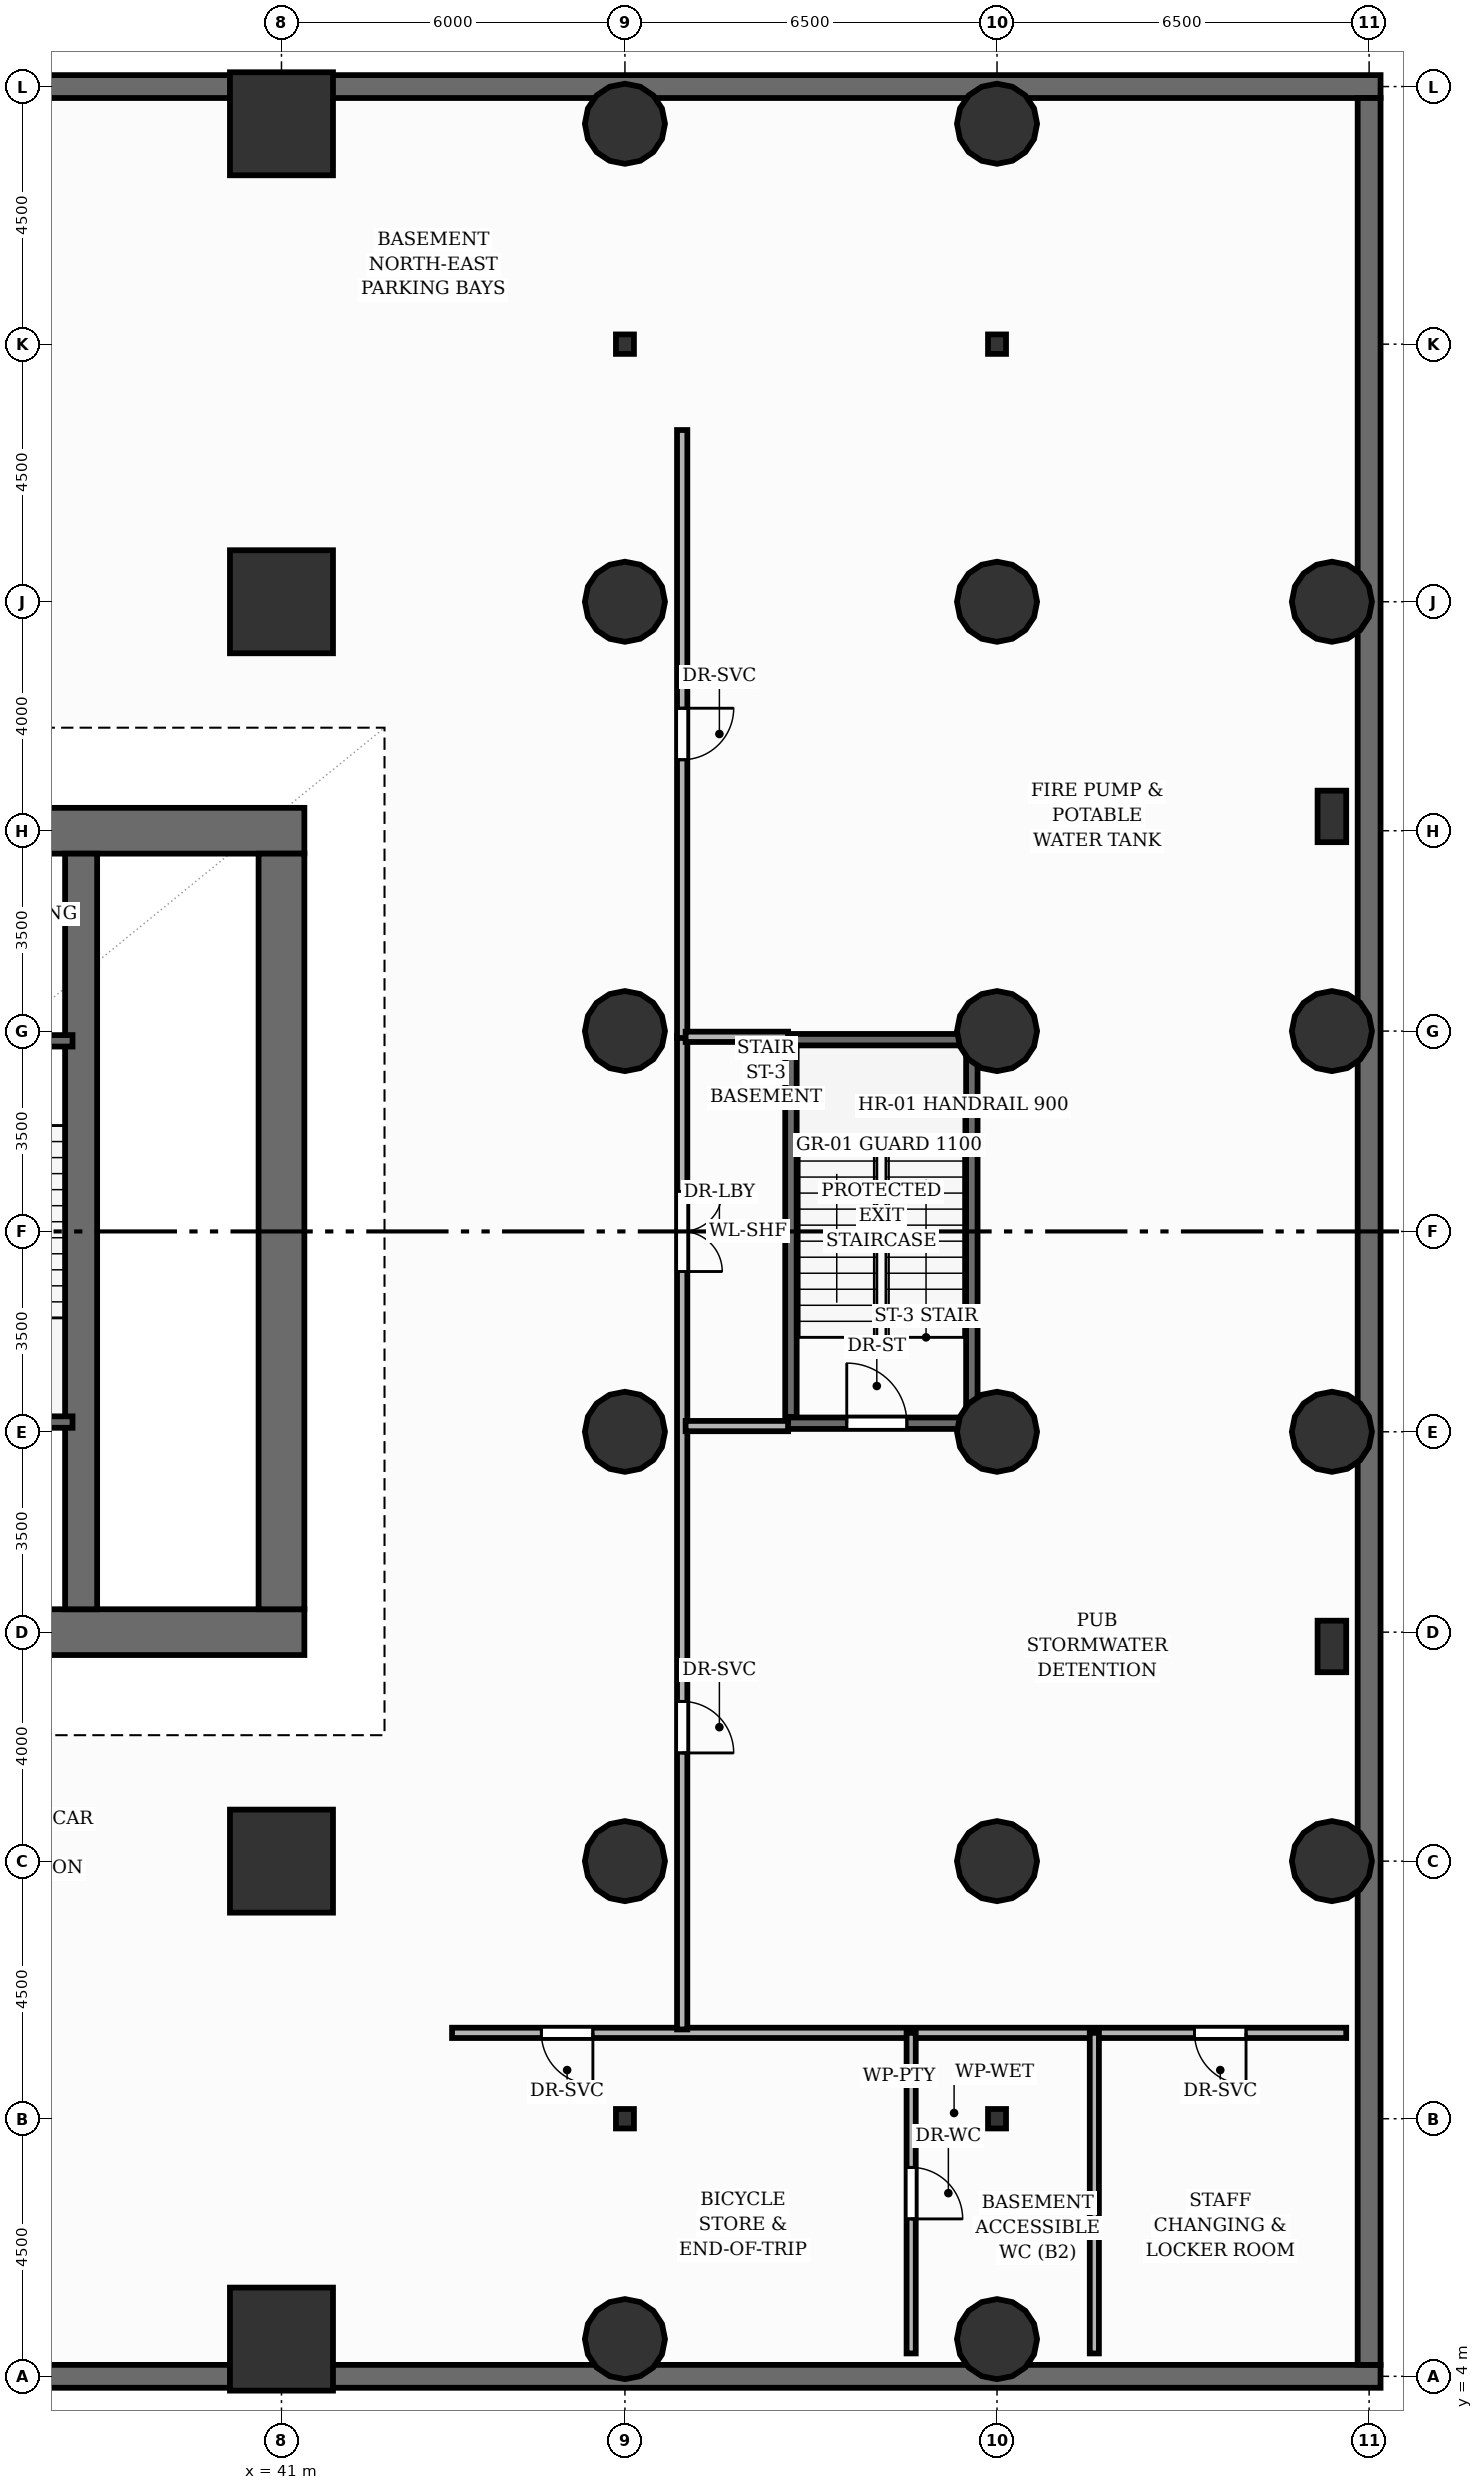
"""IFC4 building model, lengths in metres.
Left out: names, types, materials, properties, quantities, classifications, styles, units other than length and angle.
Written with IfcOpenShell. Run it as: python <this file> out.ifc"""

import sys

from ifc_helpers import new_model, si_unit, direction, frame, frame_2d, origin, origin_2d, place, context, subcontext, project, spatial, rectangle, circle, i_section, extrude, element, fill, save


model = new_model("IFC4")
c1 = context("Model", 3, precision=1e-05, world=origin(), true_north=direction((0.0, 1.0)))
c2 = subcontext(c1, "Body", "Model", "MODEL_VIEW")
j1 = project(units=[si_unit("LENGTHUNIT", "METRE"), si_unit("PLANEANGLEUNIT", "RADIAN")], contexts=[c1])
p1 = place(None, origin())
s1 = spatial("IfcSite", under=j1, at=p1, CompositionType="ELEMENT")
p2 = place(p1, origin())
s2 = spatial("IfcBuilding", under=s1, at=p2, CompositionType="ELEMENT")
p3 = place(p2, frame((0.0, 0.0, -9.0)))
s3 = spatial("IfcBuildingStorey", under=s2, at=p3, CompositionType="ELEMENT", Elevation=-9.0)
for number, where, z_axis, x_axis in (
    (1, (3.8, 4.0, 0.0), (0.0, 0.0, 1.0), (1.0, 0.0, 0.0)),
    (2, (3.8, 44.0, 0.0), (0.0, 0.0, 1.0), (1.0, 0.0, 0.0)),
):
    element("IfcWall", number, at=place(p3, frame(where, z_axis=z_axis, x_axis=x_axis)), inside=s3, PredefinedType="USERDEFINED", context=c2, shape_type="SweptSolid", body=[
        extrude(rectangle(XDim=56.4, YDim=0.4, at=frame_2d((28.2, 0.0))), origin(), (0.0, 0.0, 1.0), 4.5),
    ])
p4 = place(p3, frame((60.0, 4.2, 0.0), z_axis=(0.0, 0.0, 1.0), x_axis=(0.0, 1.0, 0.0)))
e3 = element("IfcWall", 3, at=p4, inside=s3, PredefinedType="USERDEFINED", context=c2, shape_type="SweptSolid", body=[
    extrude(rectangle(XDim=39.6, YDim=0.4, at=frame_2d((19.8, 0.0))), origin(), (0.0, 0.0, 1.0), 4.5),
])
p5 = place(p3, frame((22.6, 17.0, 0.0), z_axis=(0.0, 0.0, 1.0), x_axis=(1.0, 0.0, 0.0)))
e4 = element("IfcWall", 4, at=p5, inside=s3, PredefinedType="SHEAR", context=c2, shape_type="SweptSolid", body=[
    extrude(rectangle(XDim=18.8, YDim=0.8, at=frame_2d((9.4, 0.0))), origin(), (0.0, 0.0, 1.0), 4.5),
])
p6 = place(p5, frame((5.9, 0.0, 0.0)))
e5 = element("IfcOpeningElement", 5, at=p6, cuts=e4, PredefinedType="OPENING", context=c2, shape_type="SweptSolid", body=[
    extrude(rectangle(XDim=1.1, YDim=2.15, at=frame_2d((0.55, 1.075))), frame((0.0, 0.41, 0.0), z_axis=(0.0, -1.0, 0.0), x_axis=(1.0, 0.0, 0.0)), (0.0, 0.0, 1.0), 0.82),
])
p7 = place(p3, frame((22.6, 31.0, 0.0), z_axis=(0.0, 0.0, 1.0), x_axis=(1.0, 0.0, 0.0)))
e6 = element("IfcWall", 6, at=p7, inside=s3, PredefinedType="SHEAR", context=c2, shape_type="SweptSolid", body=[
    extrude(rectangle(XDim=18.8, YDim=0.8, at=frame_2d((9.4, 0.0))), origin(), (0.0, 0.0, 1.0), 4.5),
])
p8 = place(p7, frame((11.8, 0.0, 0.0)))
e7 = element("IfcOpeningElement", 7, at=p8, cuts=e6, PredefinedType="OPENING", context=c2, shape_type="SweptSolid", body=[
    extrude(rectangle(XDim=1.1, YDim=2.15, at=frame_2d((0.55, 1.075))), frame((0.0, 0.41, 0.0), z_axis=(0.0, -1.0, 0.0), x_axis=(1.0, 0.0, 0.0)), (0.0, 0.0, 1.0), 0.82),
])
p9 = place(p3, frame((41.0, 17.4, 0.0), z_axis=(0.0, 0.0, 1.0), x_axis=(0.0, 1.0, 0.0)))
e8 = element("IfcWall", 8, at=p9, inside=s3, PredefinedType="SHEAR", context=c2, shape_type="SweptSolid", body=[
    extrude(rectangle(XDim=13.2, YDim=0.8, at=frame_2d((6.6, 0.0))), origin(), (0.0, 0.0, 1.0), 4.5),
])
p10 = place(p3, frame((37.5, 17.4, 0.0), z_axis=(0.0, 0.0, 1.0), x_axis=(0.0, 1.0, 0.0)))
e9 = element("IfcWall", 9, at=p10, inside=s3, PredefinedType="SHEAR", context=c2, shape_type="SweptSolid", body=[
    extrude(rectangle(XDim=13.2, YDim=0.56, at=frame_2d((6.6, 0.0))), origin(), (0.0, 0.0, 1.0), 4.5),
])
for number, where, z_axis, x_axis in (
    (10, (47.0, 4.65, 0.0), (0.0, 0.0, 1.0), (1.0, 0.0, 0.0)),
    (11, (47.0, 13.0, 0.0), (0.0, 0.0, 1.0), (1.0, 0.0, 0.0)),
    (12, (47.0, 20.5, 0.0), (0.0, 0.0, 1.0), (1.0, 0.0, 0.0)),
    (13, (47.0, 27.5, 0.0), (0.0, 0.0, 1.0), (1.0, 0.0, 0.0)),
    (14, (47.0, 35.0, 0.0), (0.0, 0.0, 1.0), (1.0, 0.0, 0.0)),
    (15, (47.0, 43.35, 0.0), (0.0, 0.0, 1.0), (1.0, 0.0, 0.0)),
    (16, (53.5, 4.65, 0.0), (0.0, 0.0, 1.0), (1.0, 0.0, 0.0)),
    (17, (53.5, 13.0, 0.0), (0.0, 0.0, 1.0), (1.0, 0.0, 0.0)),
    (18, (53.5, 20.5, 0.0), (0.0, 0.0, 1.0), (1.0, 0.0, 0.0)),
    (19, (53.5, 27.5, 0.0), (0.0, 0.0, 1.0), (1.0, 0.0, 0.0)),
    (20, (53.5, 35.0, 0.0), (0.0, 0.0, 1.0), (1.0, 0.0, 0.0)),
    (21, (53.5, 43.35, 0.0), (0.0, 0.0, 1.0), (1.0, 0.0, 0.0)),
    (22, (59.35, 13.0, 0.0), (0.0, 0.0, 1.0), (1.0, 0.0, 0.0)),
    (23, (59.35, 20.5, 0.0), (0.0, 0.0, 1.0), (1.0, 0.0, 0.0)),
    (24, (59.35, 27.5, 0.0), (0.0, 0.0, 1.0), (1.0, 0.0, 0.0)),
    (25, (59.35, 35.0, 0.0), (0.0, 0.0, 1.0), (1.0, 0.0, 0.0)),
):
    element("IfcColumn", number, at=place(p3, frame(where, z_axis=z_axis, x_axis=x_axis)), inside=s3, PredefinedType="COLUMN", context=c2, shape_type="SweptSolid", body=[
        extrude(circle(Radius=0.7, at=origin_2d()), origin(), (0.0, 0.0, 1.0), 4.5),
    ])
for number, where, z_axis, x_axis in (
    (26, (41.0, 4.65, 0.0), (0.0, 0.0, 1.0), (1.0, 0.0, 0.0)),
    (27, (41.0, 13.0, 0.0), (0.0, 0.0, 1.0), (1.0, 0.0, 0.0)),
    (28, (41.0, 35.0, 0.0), (0.0, 0.0, 1.0), (1.0, 0.0, 0.0)),
    (29, (41.0, 43.35, 0.0), (0.0, 0.0, 1.0), (1.0, 0.0, 0.0)),
):
    element("IfcColumn", number, at=place(p3, frame(where, z_axis=z_axis, x_axis=x_axis)), inside=s3, PredefinedType="COLUMN", context=c2, shape_type="SweptSolid", body=[
        extrude(rectangle(XDim=1.8, YDim=1.8, at=origin_2d()), origin(), (0.0, 0.0, 1.0), 4.5),
    ])
for number, where, z_axis, x_axis in (
    (30, (47.0, 8.5, 0.0), (0.0, 0.0, 1.0), (1.0, 0.0, 0.0)),
    (31, (53.5, 8.5, 0.0), (0.0, 0.0, 1.0), (1.0, 0.0, 0.0)),
    (32, (47.0, 39.5, 0.0), (0.0, 0.0, 1.0), (1.0, 0.0, 0.0)),
    (33, (53.5, 39.5, 0.0), (0.0, 0.0, 1.0), (1.0, 0.0, 0.0)),
):
    element("IfcColumn", number, at=place(p3, frame(where, z_axis=z_axis, x_axis=x_axis)), inside=s3, PredefinedType="COLUMN", context=c2, shape_type="SweptSolid", body=[
        extrude(i_section(OverallWidth=0.314, OverallDepth=0.34, WebThickness=0.019, FlangeThickness=0.031, at=origin_2d()), origin(), (0.0, 0.0, 1.0), 4.5),
    ])
for number, where, z_axis, x_axis in (
    (34, (59.35, 16.75, 0.0), (0.0, 0.0, 1.0), (1.0, 0.0, 0.0)),
    (35, (59.35, 31.25, 0.0), (0.0, 0.0, 1.0), (1.0, 0.0, 0.0)),
):
    element("IfcColumn", number, at=place(p3, frame(where, z_axis=z_axis, x_axis=x_axis)), inside=s3, PredefinedType="PILASTER", context=c2, shape_type="SweptSolid", body=[
        extrude(rectangle(XDim=0.5, YDim=0.9, at=origin_2d()), origin(), (0.0, 0.0, 1.0), 4.5),
    ])
p11 = place(p3, frame((34.11, 20.67, 0.0), z_axis=(0.0, 0.0, 1.0), x_axis=(1.0, 0.0, 0.0)))
e36 = element("IfcWall", 36, at=p11, inside=s3, PredefinedType="SHEAR", context=c2, shape_type="SweptSolid", body=[
    extrude(rectangle(XDim=3.24, YDim=0.2, at=frame_2d((1.62, 0.0))), origin(), (0.0, 0.0, 1.0), 4.5),
])
p12 = place(p3, frame((34.11, 27.33, 0.0), z_axis=(0.0, 0.0, 1.0), x_axis=(1.0, 0.0, 0.0)))
e37 = element("IfcWall", 37, at=p12, inside=s3, PredefinedType="SHEAR", context=c2, shape_type="SweptSolid", body=[
    extrude(rectangle(XDim=3.24, YDim=0.2, at=frame_2d((1.62, 0.0))), origin(), (0.0, 0.0, 1.0), 4.5),
])
p13 = place(p12, frame((1.135, 0.0, 0.0)))
e38 = element("IfcOpeningElement", 38, at=p13, cuts=e37, PredefinedType="OPENING", context=c2, shape_type="SweptSolid", body=[
    extrude(rectangle(XDim=1.05, YDim=2.15, at=frame_2d((0.525, 1.075))), frame((0.0, 0.11, 0.0), z_axis=(0.0, -1.0, 0.0), x_axis=(1.0, 0.0, 0.0)), (0.0, 0.0, 1.0), 0.22),
])
for number, where, z_axis, x_axis in (
    (39, (49.9, 20.76, 0.0), (0.0, 0.0, 1.0), (0.0, 1.0, 0.0)),
    (40, (53.06, 20.76, 0.0), (0.0, 0.0, 1.0), (0.0, 1.0, 0.0)),
):
    element("IfcWall", number, at=place(p3, frame(where, z_axis=z_axis, x_axis=x_axis)), inside=s3, PredefinedType="SHEAR", context=c2, shape_type="SweptSolid", body=[
        extrude(rectangle(XDim=6.48, YDim=0.2, at=frame_2d((3.24, 0.0))), origin(), (0.0, 0.0, 1.0), 4.5),
    ])
p14 = place(p3, frame((49.85, 20.65, 0.0), z_axis=(0.0, 0.0, 1.0), x_axis=(1.0, 0.0, 0.0)))
e41 = element("IfcWall", 41, at=p14, inside=s3, PredefinedType="SHEAR", context=c2, shape_type="SweptSolid", body=[
    extrude(rectangle(XDim=3.26, YDim=0.2, at=frame_2d((1.63, 0.0))), origin(), (0.0, 0.0, 1.0), 4.5),
])
p15 = place(p14, frame((1.025, 0.0, 0.0)))
e42 = element("IfcOpeningElement", 42, at=p15, cuts=e41, PredefinedType="OPENING", context=c2, shape_type="SweptSolid", body=[
    extrude(rectangle(XDim=1.05, YDim=2.15, at=frame_2d((0.525, 1.075))), frame((0.0, 0.11, 0.0), z_axis=(0.0, -1.0, 0.0), x_axis=(1.0, 0.0, 0.0)), (0.0, 0.0, 1.0), 0.22),
])
p16 = place(p3, frame((49.85, 27.35, 0.0), z_axis=(0.0, 0.0, 1.0), x_axis=(1.0, 0.0, 0.0)))
e43 = element("IfcWall", 43, at=p16, inside=s3, PredefinedType="SHEAR", context=c2, shape_type="SweptSolid", body=[
    extrude(rectangle(XDim=3.26, YDim=0.2, at=frame_2d((1.63, 0.0))), origin(), (0.0, 0.0, 1.0), 4.5),
])
p17 = place(p3, frame((59.6, 10.0, 0.0), z_axis=(0.0, 0.0, 1.0), x_axis=(-1.0, 0.0, 0.0)))
e44 = element("IfcWall", 44, at=p17, inside=s3, PredefinedType="PARTITIONING", context=c2, shape_type="SweptSolid", body=[
    extrude(rectangle(XDim=15.62, YDim=0.18, at=frame_2d((7.81, 0.0))), origin(), (0.0, 0.0, 1.0), 4.195),
])
p18 = place(p17, frame((13.16, 0.0, 0.0)))
e45 = element("IfcOpeningElement", 45, at=p18, cuts=e44, PredefinedType="OPENING", context=c2, shape_type="SweptSolid", body=[
    extrude(rectangle(XDim=0.9, YDim=2.1, at=frame_2d((0.45, 1.05))), frame((0.0, 0.1, 0.0), z_axis=(0.0, -1.0, 0.0), x_axis=(1.0, 0.0, 0.0)), (0.0, 0.0, 1.0), 0.2),
])
p19 = place(p17, frame((1.75, 0.0, 0.0)))
e46 = element("IfcOpeningElement", 46, at=p19, cuts=e44, PredefinedType="OPENING", context=c2, shape_type="SweptSolid", body=[
    extrude(rectangle(XDim=0.9, YDim=2.1, at=frame_2d((0.45, 1.05))), frame((0.0, 0.1, 0.0), z_axis=(0.0, -1.0, 0.0), x_axis=(1.0, 0.0, 0.0)), (0.0, 0.0, 1.0), 0.2),
])
p20 = place(p3, frame((48.0, 27.42, 0.0), z_axis=(0.0, 0.0, 1.0), x_axis=(0.0, -1.0, 0.0)))
e47 = element("IfcWall", 47, at=p20, inside=s3, PredefinedType="PARTITIONING", context=c2, shape_type="SweptSolid", body=[
    extrude(rectangle(XDim=17.36, YDim=0.18, at=frame_2d((8.68, 0.0))), origin(), (0.0, 0.0, 1.0), 4.195),
])
p21 = place(p20, frame((11.63, 0.0, 0.0)))
e48 = element("IfcOpeningElement", 48, at=p21, cuts=e47, PredefinedType="OPENING", context=c2, shape_type="SweptSolid", body=[
    extrude(rectangle(XDim=0.9, YDim=2.1, at=frame_2d((0.45, 1.05))), frame((0.0, 0.1, 0.0), z_axis=(0.0, -1.0, 0.0), x_axis=(1.0, 0.0, 0.0)), (0.0, 0.0, 1.0), 0.2),
])
p22 = place(p20, frame((2.72, 0.0, 0.0)))
e49 = element("IfcOpeningElement", 49, at=p22, cuts=e47, PredefinedType="OPENING", context=c2, shape_type="SweptSolid", body=[
    extrude(rectangle(XDim=1.4, YDim=2.15, at=frame_2d((0.7, 1.075))), frame((0.0, 0.1, 0.0), z_axis=(0.0, -1.0, 0.0), x_axis=(1.0, 0.0, 0.0)), (0.0, 0.0, 1.0), 0.2),
])
p23 = place(p3, frame((48.0, 38.0, 0.0), z_axis=(0.0, 0.0, 1.0), x_axis=(0.0, -1.0, 0.0)))
e50 = element("IfcWall", 50, at=p23, inside=s3, PredefinedType="PARTITIONING", context=c2, shape_type="SweptSolid", body=[
    extrude(rectangle(XDim=10.62, YDim=0.18, at=frame_2d((5.31, 0.0))), origin(), (0.0, 0.0, 1.0), 4.195),
])
p24 = place(p23, frame((4.86, 0.0, 0.0)))
e51 = element("IfcOpeningElement", 51, at=p24, cuts=e50, PredefinedType="OPENING", context=c2, shape_type="SweptSolid", body=[
    extrude(rectangle(XDim=0.9, YDim=2.1, at=frame_2d((0.45, 1.05))), frame((0.0, 0.1, 0.0), z_axis=(0.0, -1.0, 0.0), x_axis=(1.0, 0.0, 0.0)), (0.0, 0.0, 1.0), 0.2),
])
p25 = place(p3, frame((52.0, 10.0, 0.0), z_axis=(0.0, 0.0, 1.0), x_axis=(0.0, -1.0, 0.0)))
e52 = element("IfcWall", 52, at=p25, inside=s3, PredefinedType="PLUMBINGWALL", context=c2, shape_type="SweptSolid", body=[
    extrude(rectangle(XDim=5.6, YDim=0.16, at=frame_2d((2.8, 0.0))), origin(), (0.0, 0.0, 1.0), 4.195),
])
p26 = place(p25, frame((2.35, 0.0, 0.0)))
e53 = element("IfcOpeningElement", 53, at=p26, cuts=e52, PredefinedType="OPENING", context=c2, shape_type="SweptSolid", body=[
    extrude(rectangle(XDim=0.9, YDim=2.1, at=frame_2d((0.45, 1.05))), frame((0.0, 0.09, 0.0), z_axis=(0.0, -1.0, 0.0), x_axis=(1.0, 0.0, 0.0)), (0.0, 0.0, 1.0), 0.18),
])
p27 = place(p3, frame((55.2, 10.0, 0.0), z_axis=(0.0, 0.0, 1.0), x_axis=(0.0, -1.0, 0.0)))
e54 = element("IfcWall", 54, at=p27, inside=s3, PredefinedType="PLUMBINGWALL", context=c2, shape_type="SweptSolid", body=[
    extrude(rectangle(XDim=5.6, YDim=0.16, at=frame_2d((2.8, 0.0))), origin(), (0.0, 0.0, 1.0), 4.195),
])
for number, where, z_axis, x_axis in (
    (55, (48.06, 20.6, 0.0), (0.0, 0.0, 1.0), (1.0, 0.0, 0.0)),
    (56, (49.85, 27.4, 0.0), (0.0, 0.0, 1.0), (-1.0, 0.0, 0.0)),
):
    element("IfcWall", number, at=place(p3, frame(where, z_axis=z_axis, x_axis=x_axis)), inside=s3, PredefinedType="PARTITIONING", context=c2, shape_type="SweptSolid", body=[
        extrude(rectangle(XDim=1.79, YDim=0.18, at=frame_2d((0.895, 0.0))), origin(), (0.0, 0.0, 1.0), 3.644),
    ])
p28 = place(p15, origin())
e57 = element("IfcDoor", 57, at=p28, inside=s3, OperationType="SINGLE_SWING_LEFT", PredefinedType="DOOR", context=c2, shape_type="SweptSolid", body=[
    extrude(rectangle(XDim=1.05, YDim=2.15, at=frame_2d((0.525, 1.075))), frame((0.0, 0.025, 0.0), z_axis=(0.0, -1.0, 0.0), x_axis=(1.0, 0.0, 0.0)), (0.0, 0.0, 1.0), 0.05),
])
fill(e42, e57)
p29 = place(p18, origin())
e58 = element("IfcDoor", 58, at=p29, inside=s3, OperationType="SINGLE_SWING_LEFT", PredefinedType="DOOR", context=c2, shape_type="SweptSolid", body=[
    extrude(rectangle(XDim=0.9, YDim=2.1, at=frame_2d((0.45, 1.05))), frame((0.0, 0.025, 0.0), z_axis=(0.0, -1.0, 0.0), x_axis=(1.0, 0.0, 0.0)), (0.0, 0.0, 1.0), 0.05),
])
fill(e45, e58)
p30 = place(p26, origin())
e59 = element("IfcDoor", 59, at=p30, inside=s3, OperationType="SINGLE_SWING_RIGHT", PredefinedType="DOOR", context=c2, shape_type="SweptSolid", body=[
    extrude(rectangle(XDim=0.9, YDim=2.1, at=frame_2d((0.45, 1.05))), frame((0.0, 0.025, 0.0), z_axis=(0.0, -1.0, 0.0), x_axis=(1.0, 0.0, 0.0)), (0.0, 0.0, 1.0), 0.05),
])
fill(e53, e59)
p31 = place(p19, origin())
e60 = element("IfcDoor", 60, at=p31, inside=s3, OperationType="SINGLE_SWING_LEFT", PredefinedType="DOOR", context=c2, shape_type="SweptSolid", body=[
    extrude(rectangle(XDim=0.9, YDim=2.1, at=frame_2d((0.45, 1.05))), frame((0.0, 0.025, 0.0), z_axis=(0.0, -1.0, 0.0), x_axis=(1.0, 0.0, 0.0)), (0.0, 0.0, 1.0), 0.05),
])
fill(e46, e60)
p32 = place(p21, origin())
e61 = element("IfcDoor", 61, at=p32, inside=s3, OperationType="SINGLE_SWING_RIGHT", PredefinedType="DOOR", context=c2, shape_type="SweptSolid", body=[
    extrude(rectangle(XDim=0.9, YDim=2.1, at=frame_2d((0.45, 1.05))), frame((0.0, 0.025, 0.0), z_axis=(0.0, -1.0, 0.0), x_axis=(1.0, 0.0, 0.0)), (0.0, 0.0, 1.0), 0.05),
])
fill(e48, e61)
p33 = place(p24, origin())
e62 = element("IfcDoor", 62, at=p33, inside=s3, OperationType="SINGLE_SWING_LEFT", PredefinedType="DOOR", context=c2, shape_type="SweptSolid", body=[
    extrude(rectangle(XDim=0.9, YDim=2.1, at=frame_2d((0.45, 1.05))), frame((0.0, 0.025, 0.0), z_axis=(0.0, -1.0, 0.0), x_axis=(1.0, 0.0, 0.0)), (0.0, 0.0, 1.0), 0.05),
])
fill(e51, e62)
p34 = place(p22, origin())
e63 = element("IfcDoor", 63, at=p34, inside=s3, OperationType="DOUBLE_DOOR_SINGLE_SWING", PredefinedType="DOOR", context=c2, shape_type="SweptSolid", body=[
    extrude(rectangle(XDim=1.4, YDim=2.15, at=frame_2d((0.7, 1.075))), frame((0.0, 0.025, 0.0), z_axis=(0.0, -1.0, 0.0), x_axis=(1.0, 0.0, 0.0)), (0.0, 0.0, 1.0), 0.05),
])
fill(e49, e63)
save(model, sys.argv[1])
